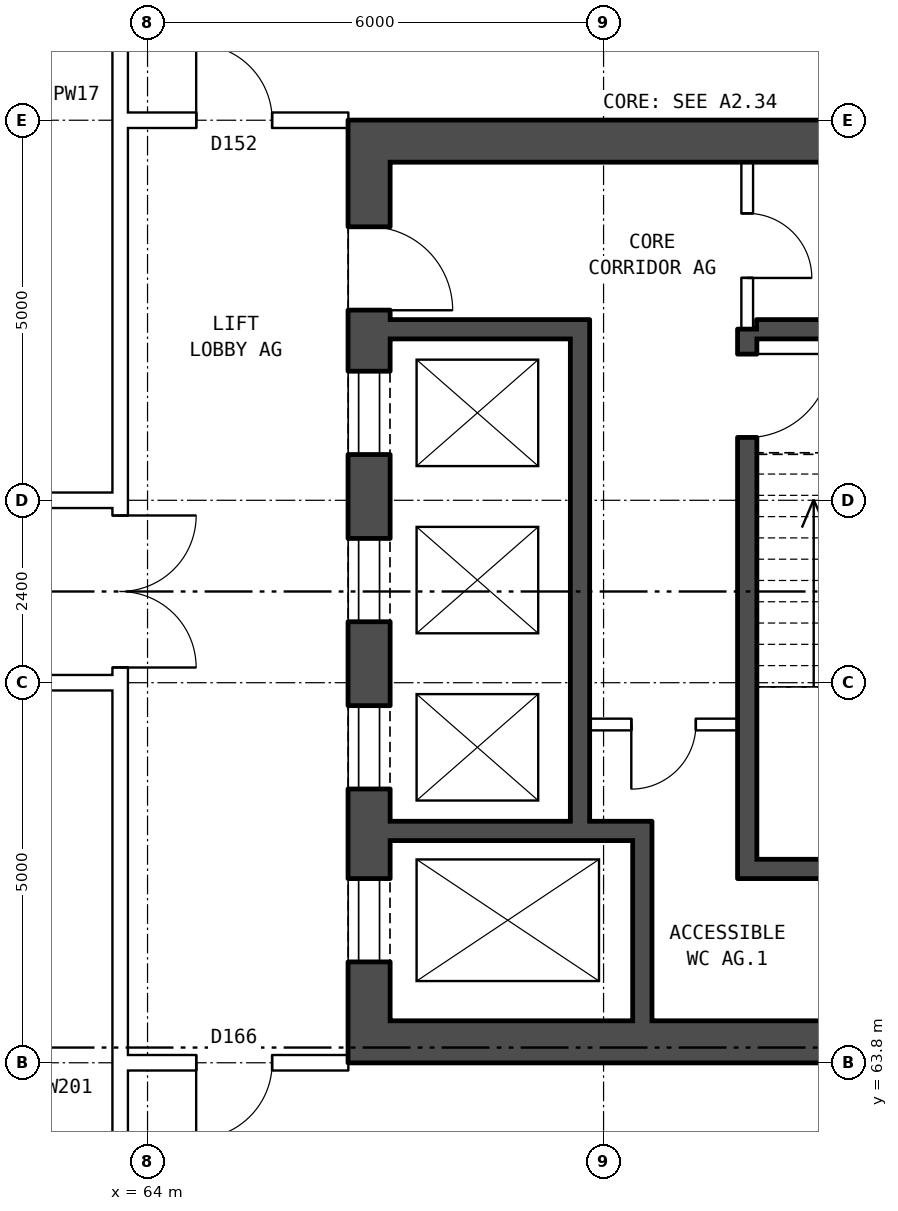
"""IFC4 building model, lengths in metres.
Left out: names, types, materials, properties, quantities, classifications, styles, units other than length and angle.
Written with IfcOpenShell. Run it as: python <this file> out.ifc"""

import sys

from ifc_helpers import new_model, si_unit, direction, frame, frame_2d, origin, place, context, subcontext, project, spatial, rectangle, extrude, element, fill, save


model = new_model("IFC4")
c1 = context("Model", 3, precision=1e-05, world=origin(), true_north=direction((0.0, 1.0)))
c2 = subcontext(c1, "Body", "Model", "MODEL_VIEW")
j1 = project(units=[si_unit("LENGTHUNIT", "METRE"), si_unit("PLANEANGLEUNIT", "RADIAN")], contexts=[c1])
p1 = place(None, origin())
s1 = spatial("IfcSite", under=j1, at=p1, CompositionType="ELEMENT")
p2 = place(p1, origin())
s2 = spatial("IfcBuilding", under=s1, at=p2, CompositionType="ELEMENT")
p3 = place(p2, frame((0.0, 0.0, 119.5)))
s3 = spatial("IfcBuildingStorey", under=s2, at=p3, CompositionType="ELEMENT", Elevation=119.5)
p4 = place(p3, frame((66.915, 63.8, 0.0), z_axis=(0.0, 0.0, 1.0), x_axis=(0.0, 1.0, 0.0)))
e1 = element("IfcWall", 1, at=p4, inside=s3, PredefinedType="SHEAR", context=c2, shape_type="SweptSolid", body=[
    extrude(rectangle(XDim=12.4, YDim=0.55, at=frame_2d((6.2, 0.0))), origin(), (0.0, 0.0, 1.0), 3.6),
])
p5 = place(p4, frame((1.325, 0.0, 0.0)))
e2 = element("IfcOpeningElement", 2, at=p5, cuts=e1, PredefinedType="OPENING", context=c2, shape_type="SweptSolid", body=[
    extrude(rectangle(XDim=1.1, YDim=2.1, at=frame_2d((0.55, 1.05))), frame((0.0, 0.285, 0.0), z_axis=(0.0, -1.0, 0.0), x_axis=(1.0, 0.0, 0.0)), (0.0, 0.0, 1.0), 0.57),
])
p6 = place(p4, frame((3.6, 0.0, 0.0)))
e3 = element("IfcOpeningElement", 3, at=p6, cuts=e1, PredefinedType="OPENING", context=c2, shape_type="SweptSolid", body=[
    extrude(rectangle(XDim=1.1, YDim=2.1, at=frame_2d((0.55, 1.05))), frame((0.0, 0.285, 0.0), z_axis=(0.0, -1.0, 0.0), x_axis=(1.0, 0.0, 0.0)), (0.0, 0.0, 1.0), 0.57),
])
p7 = place(p4, frame((5.8, 0.0, 0.0)))
e4 = element("IfcOpeningElement", 4, at=p7, cuts=e1, PredefinedType="OPENING", context=c2, shape_type="SweptSolid", body=[
    extrude(rectangle(XDim=1.1, YDim=2.1, at=frame_2d((0.55, 1.05))), frame((0.0, 0.285, 0.0), z_axis=(0.0, -1.0, 0.0), x_axis=(1.0, 0.0, 0.0)), (0.0, 0.0, 1.0), 0.57),
])
p8 = place(p4, frame((8.0, 0.0, 0.0)))
e5 = element("IfcOpeningElement", 5, at=p8, cuts=e1, PredefinedType="OPENING", context=c2, shape_type="SweptSolid", body=[
    extrude(rectangle(XDim=1.1, YDim=2.1, at=frame_2d((0.55, 1.05))), frame((0.0, 0.285, 0.0), z_axis=(0.0, -1.0, 0.0), x_axis=(1.0, 0.0, 0.0)), (0.0, 0.0, 1.0), 0.57),
])
p9 = place(p4, frame((9.9, 0.0, 0.0)))
e6 = element("IfcOpeningElement", 6, at=p9, cuts=e1, PredefinedType="OPENING", context=c2, shape_type="SweptSolid", body=[
    extrude(rectangle(XDim=1.1, YDim=2.1, at=frame_2d((0.55, 1.05))), frame((0.0, 0.285, 0.0), z_axis=(0.0, -1.0, 0.0), x_axis=(1.0, 0.0, 0.0)), (0.0, 0.0, 1.0), 0.57),
])
for number, where, z_axis, x_axis in (
    (7, (67.19, 64.075, 0.0), (0.0, 0.0, 1.0), (1.0, 0.0, 0.0)),
    (8, (67.19, 75.925, 0.0), (0.0, 0.0, 1.0), (1.0, 0.0, 0.0)),
):
    element("IfcWall", number, at=place(p3, frame(where, z_axis=z_axis, x_axis=x_axis)), inside=s3, PredefinedType="SHEAR", context=c2, shape_type="SweptSolid", body=[
        extrude(rectangle(XDim=7.9, YDim=0.55, at=frame_2d((3.95, 0.0))), origin(), (0.0, 0.0, 1.0), 3.6),
    ])
p10 = place(p3, frame((72.015, 66.35, 0.0), z_axis=(0.0, 0.0, 1.0), x_axis=(1.0, 0.0, 0.0)))
e9 = element("IfcWall", 9, at=p10, inside=s3, PredefinedType="SHEAR", context=c2, shape_type="SweptSolid", body=[
    extrude(rectangle(XDim=3.075, YDim=0.25, at=frame_2d((1.538, 0.0))), origin(), (0.0, 0.0, 1.0), 3.6),
])
p11 = place(p3, frame((67.19, 66.85, 0.0), z_axis=(0.0, 0.0, 1.0), x_axis=(1.0, 0.0, 0.0)))
e10 = element("IfcWall", 10, at=p11, inside=s3, PredefinedType="SHEAR", context=c2, shape_type="SweptSolid", body=[
    extrude(rectangle(XDim=3.445, YDim=0.25, at=frame_2d((1.723, 0.0))), origin(), (0.0, 0.0, 1.0), 3.6),
])
p12 = place(p3, frame((69.815, 68.25, 0.0), z_axis=(0.0, 0.0, 1.0), x_axis=(1.0, 0.0, 0.0)))
e11 = element("IfcWall", 11, at=p12, inside=s3, PredefinedType="PARTITIONING", context=c2, shape_type="SweptSolid", body=[
    extrude(rectangle(XDim=1.95, YDim=0.15, at=frame_2d((0.975, 0.0))), origin(), (0.0, 0.0, 1.0), 3.6),
])
p13 = place(p12, frame((0.55, 0.0, 0.0)))
e12 = element("IfcOpeningElement", 12, at=p13, cuts=e11, PredefinedType="OPENING", context=c2, shape_type="SweptSolid", body=[
    extrude(rectangle(XDim=0.85, YDim=2.1, at=frame_2d((0.425, 1.05))), frame((0.0, 0.085, 0.0), z_axis=(0.0, -1.0, 0.0), x_axis=(1.0, 0.0, 0.0)), (0.0, 0.0, 1.0), 0.17),
])
p14 = place(p3, frame((67.19, 73.45, 0.0), z_axis=(0.0, 0.0, 1.0), x_axis=(1.0, 0.0, 0.0)))
e13 = element("IfcWall", 13, at=p14, inside=s3, PredefinedType="SHEAR", context=c2, shape_type="SweptSolid", body=[
    extrude(rectangle(XDim=2.375, YDim=0.25, at=frame_2d((1.188, 0.0))), origin(), (0.0, 0.0, 1.0), 3.6),
])
p15 = place(p3, frame((72.015, 73.45, 0.0), z_axis=(0.0, 0.0, 1.0), x_axis=(1.0, 0.0, 0.0)))
e14 = element("IfcWall", 14, at=p15, inside=s3, PredefinedType="SHEAR", context=c2, shape_type="SweptSolid", body=[
    extrude(rectangle(XDim=3.075, YDim=0.25, at=frame_2d((1.538, 0.0))), origin(), (0.0, 0.0, 1.0), 3.6),
])
p16 = place(p3, frame((69.69, 66.975, 0.0), z_axis=(0.0, 0.0, 1.0), x_axis=(0.0, 1.0, 0.0)))
e15 = element("IfcWall", 15, at=p16, inside=s3, PredefinedType="SHEAR", context=c2, shape_type="SweptSolid", body=[
    extrude(rectangle(XDim=6.6, YDim=0.25, at=frame_2d((3.3, 0.0))), origin(), (0.0, 0.0, 1.0), 3.6),
])
p17 = place(p3, frame((70.51, 64.35, 0.0), z_axis=(0.0, 0.0, 1.0), x_axis=(0.0, 1.0, 0.0)))
e16 = element("IfcWall", 16, at=p17, inside=s3, PredefinedType="SHEAR", context=c2, shape_type="SweptSolid", body=[
    extrude(rectangle(XDim=2.375, YDim=0.25, at=frame_2d((1.188, 0.0))), origin(), (0.0, 0.0, 1.0), 3.6),
])
p18 = place(p3, frame((71.89, 66.225, 0.0), z_axis=(0.0, 0.0, 1.0), x_axis=(0.0, 1.0, 0.0)))
e17 = element("IfcWall", 17, at=p18, inside=s3, PredefinedType="SHEAR", context=c2, shape_type="SweptSolid", body=[
    extrude(rectangle(XDim=7.225, YDim=0.25, at=frame_2d((3.612, 0.0))), origin(), (0.0, 0.0, 1.0), 3.6),
])
p19 = place(p18, frame((5.8, 0.0, 0.0)))
e18 = element("IfcOpeningElement", 18, at=p19, cuts=e17, PredefinedType="OPENING", context=c2, shape_type="SweptSolid", body=[
    extrude(rectangle(XDim=1.1, YDim=2.1, at=frame_2d((0.55, 1.05))), frame((0.0, 0.135, 0.0), z_axis=(0.0, -1.0, 0.0), x_axis=(1.0, 0.0, 0.0)), (0.0, 0.0, 1.0), 0.27),
])
p20 = place(p3, frame((71.89, 73.45, 0.0), z_axis=(0.0, 0.0, 1.0), x_axis=(0.0, 1.0, 0.0)))
e19 = element("IfcWall", 19, at=p20, inside=s3, PredefinedType="PARTITIONING", context=c2, shape_type="SweptSolid", body=[
    extrude(rectangle(XDim=2.2, YDim=0.15, at=frame_2d((1.1, 0.0))), origin(), (0.0, 0.0, 1.0), 3.6),
])
p21 = place(p20, frame((0.675, 0.0, 0.0)))
e20 = element("IfcOpeningElement", 20, at=p21, cuts=e19, PredefinedType="OPENING", context=c2, shape_type="SweptSolid", body=[
    extrude(rectangle(XDim=0.85, YDim=2.1, at=frame_2d((0.425, 1.05))), frame((0.0, 0.085, 0.0), z_axis=(0.0, -1.0, 0.0), x_axis=(1.0, 0.0, 0.0)), (0.0, 0.0, 1.0), 0.17),
])
p22 = place(p3, frame((63.64, 63.9, 0.0), z_axis=(0.0, 0.0, 1.0), x_axis=(0.0, 1.0, 0.0)))
e21 = element("IfcWall", 21, at=p22, inside=s3, PredefinedType="PARTITIONING", context=c2, shape_type="SweptSolid", body=[
    extrude(rectangle(XDim=12.2, YDim=0.2, at=frame_2d((6.1, 0.0))), origin(), (0.0, 0.0, 1.0), 3.6),
])
p23 = place(p22, frame((5.1, 0.0, 0.0)))
e22 = element("IfcOpeningElement", 22, at=p23, cuts=e21, PredefinedType="OPENING", context=c2, shape_type="SweptSolid", body=[
    extrude(rectangle(XDim=2.0, YDim=2.1, at=frame_2d((1.0, 1.05))), frame((0.0, 0.11, 0.0), z_axis=(0.0, -1.0, 0.0), x_axis=(1.0, 0.0, 0.0)), (0.0, 0.0, 1.0), 0.22),
])
p24 = place(p3, frame((63.54, 63.8, 0.0), z_axis=(0.0, 0.0, 1.0), x_axis=(1.0, 0.0, 0.0)))
e23 = element("IfcWall", 23, at=p24, inside=s3, PredefinedType="PARTITIONING", context=c2, shape_type="SweptSolid", body=[
    extrude(rectangle(XDim=3.1, YDim=0.2, at=frame_2d((1.55, 0.0))), origin(), (0.0, 0.0, 1.0), 3.6),
])
p25 = place(p24, frame((1.1, 0.0, 0.0)))
e24 = element("IfcOpeningElement", 24, at=p25, cuts=e23, PredefinedType="OPENING", context=c2, shape_type="SweptSolid", body=[
    extrude(rectangle(XDim=1.0, YDim=2.1, at=frame_2d((0.5, 1.05))), frame((0.0, 0.11, 0.0), z_axis=(0.0, -1.0, 0.0), x_axis=(1.0, 0.0, 0.0)), (0.0, 0.0, 1.0), 0.22),
])
p26 = place(p3, frame((44.36, 68.8, 0.0), z_axis=(0.0, 0.0, 1.0), x_axis=(1.0, 0.0, 0.0)))
e25 = element("IfcWall", 25, at=p26, inside=s3, PredefinedType="PARTITIONING", context=c2, shape_type="SweptSolid", body=[
    extrude(rectangle(XDim=19.28, YDim=0.2, at=frame_2d((9.64, 0.0))), origin(), (0.0, 0.0, 1.0), 3.6),
])
p27 = place(p26, frame((4.92, 0.0, 0.0)))
e26 = element("IfcOpeningElement", 26, at=p27, cuts=e25, PredefinedType="OPENING", context=c2, shape_type="SweptSolid", body=[
    extrude(rectangle(XDim=1.8, YDim=2.1, at=frame_2d((0.9, 1.05))), frame((0.0, 0.11, 0.0), z_axis=(0.0, -1.0, 0.0), x_axis=(1.0, 0.0, 0.0)), (0.0, 0.0, 1.0), 0.22),
])
p28 = place(p3, frame((44.36, 71.2, 0.0), z_axis=(0.0, 0.0, 1.0), x_axis=(1.0, 0.0, 0.0)))
e27 = element("IfcWall", 27, at=p28, inside=s3, PredefinedType="PARTITIONING", context=c2, shape_type="SweptSolid", body=[
    extrude(rectangle(XDim=19.28, YDim=0.2, at=frame_2d((9.64, 0.0))), origin(), (0.0, 0.0, 1.0), 3.6),
])
p29 = place(p28, frame((9.14, 0.0, 0.0)))
e28 = element("IfcOpeningElement", 28, at=p29, cuts=e27, PredefinedType="OPENING", context=c2, shape_type="SweptSolid", body=[
    extrude(rectangle(XDim=1.0, YDim=2.1, at=frame_2d((0.5, 1.05))), frame((0.0, 0.11, 0.0), z_axis=(0.0, -1.0, 0.0), x_axis=(1.0, 0.0, 0.0)), (0.0, 0.0, 1.0), 0.22),
])
p30 = place(p3, frame((63.54, 76.2, 0.0), z_axis=(0.0, 0.0, 1.0), x_axis=(1.0, 0.0, 0.0)))
e29 = element("IfcWall", 29, at=p30, inside=s3, PredefinedType="PARTITIONING", context=c2, shape_type="SweptSolid", body=[
    extrude(rectangle(XDim=3.1, YDim=0.2, at=frame_2d((1.55, 0.0))), origin(), (0.0, 0.0, 1.0), 3.6),
])
p31 = place(p30, frame((1.1, 0.0, 0.0)))
e30 = element("IfcOpeningElement", 30, at=p31, cuts=e29, PredefinedType="OPENING", context=c2, shape_type="SweptSolid", body=[
    extrude(rectangle(XDim=1.0, YDim=2.1, at=frame_2d((0.5, 1.05))), frame((0.0, 0.11, 0.0), z_axis=(0.0, -1.0, 0.0), x_axis=(1.0, 0.0, 0.0)), (0.0, 0.0, 1.0), 0.22),
])
p32 = place(p3, frame((63.64, 60.7, 0.0), z_axis=(0.0, 0.0, 1.0), x_axis=(0.0, 1.0, 0.0)))
e31 = element("IfcWall", 31, at=p32, inside=s3, PredefinedType="PARTITIONING", context=c2, shape_type="SweptSolid", body=[
    extrude(rectangle(XDim=3.2, YDim=0.2, at=frame_2d((1.6, 0.0))), origin(), (0.0, 0.0, 1.0), 3.6),
])
p33 = place(p32, frame((1.1, 0.0, 0.0)))
e32 = element("IfcOpeningElement", 32, at=p33, cuts=e31, PredefinedType="OPENING", context=c2, shape_type="SweptSolid", body=[
    extrude(rectangle(XDim=1.0, YDim=2.1, at=frame_2d((0.5, 1.05))), frame((0.0, 0.11, 0.0), z_axis=(0.0, -1.0, 0.0), x_axis=(1.0, 0.0, 0.0)), (0.0, 0.0, 1.0), 0.22),
])
p34 = place(p3, frame((63.64, 76.1, 0.0), z_axis=(0.0, 0.0, 1.0), x_axis=(0.0, 1.0, 0.0)))
e33 = element("IfcWall", 33, at=p34, inside=s3, PredefinedType="PARTITIONING", context=c2, shape_type="SweptSolid", body=[
    extrude(rectangle(XDim=3.2, YDim=0.2, at=frame_2d((1.6, 0.0))), origin(), (0.0, 0.0, 1.0), 3.6),
])
p35 = place(p34, frame((1.1, 0.0, 0.0)))
e34 = element("IfcOpeningElement", 34, at=p35, cuts=e33, PredefinedType="OPENING", context=c2, shape_type="SweptSolid", body=[
    extrude(rectangle(XDim=1.0, YDim=2.1, at=frame_2d((0.5, 1.05))), frame((0.0, 0.11, 0.0), z_axis=(0.0, -1.0, 0.0), x_axis=(1.0, 0.0, 0.0)), (0.0, 0.0, 1.0), 0.22),
])
p36 = place(p5, origin())
e35 = element("IfcDoor", 35, at=p36, inside=s3, OperationType="DOUBLE_DOOR_SLIDING", PredefinedType="DOOR", context=c2, shape_type="SweptSolid", body=[
    extrude(rectangle(XDim=1.1, YDim=2.1, at=frame_2d((0.55, 1.05))), frame((0.0, -0.21, 0.0), z_axis=(0.0, -1.0, 0.0), x_axis=(1.0, 0.0, 0.0)), (0.0, 0.0, 1.0), 0.05),
])
fill(e2, e35)
p37 = place(p6, origin())
e36 = element("IfcDoor", 36, at=p37, inside=s3, OperationType="DOUBLE_DOOR_SLIDING", PredefinedType="DOOR", context=c2, shape_type="SweptSolid", body=[
    extrude(rectangle(XDim=1.1, YDim=2.1, at=frame_2d((0.55, 1.05))), frame((0.0, -0.21, 0.0), z_axis=(0.0, -1.0, 0.0), x_axis=(1.0, 0.0, 0.0)), (0.0, 0.0, 1.0), 0.05),
])
fill(e3, e36)
p38 = place(p7, origin())
e37 = element("IfcDoor", 37, at=p38, inside=s3, OperationType="DOUBLE_DOOR_SLIDING", PredefinedType="DOOR", context=c2, shape_type="SweptSolid", body=[
    extrude(rectangle(XDim=1.1, YDim=2.1, at=frame_2d((0.55, 1.05))), frame((0.0, -0.21, 0.0), z_axis=(0.0, -1.0, 0.0), x_axis=(1.0, 0.0, 0.0)), (0.0, 0.0, 1.0), 0.05),
])
fill(e4, e37)
p39 = place(p8, origin())
e38 = element("IfcDoor", 38, at=p39, inside=s3, OperationType="DOUBLE_DOOR_SLIDING", PredefinedType="DOOR", context=c2, shape_type="SweptSolid", body=[
    extrude(rectangle(XDim=1.1, YDim=2.1, at=frame_2d((0.55, 1.05))), frame((0.0, -0.21, 0.0), z_axis=(0.0, -1.0, 0.0), x_axis=(1.0, 0.0, 0.0)), (0.0, 0.0, 1.0), 0.05),
])
fill(e5, e38)
p40 = place(p9, frame((1.1, 0.0, 0.0), z_axis=(0.0, 0.0, 1.0), x_axis=(-1.0, 0.0, 0.0)))
e39 = element("IfcDoor", 39, at=p40, inside=s3, OperationType="SINGLE_SWING_RIGHT", PredefinedType="DOOR", context=c2, shape_type="SweptSolid", body=[
    extrude(rectangle(XDim=1.1, YDim=2.1, at=frame_2d((0.55, 1.05))), frame((0.0, 0.26, 0.0), z_axis=(0.0, -1.0, 0.0), x_axis=(1.0, 0.0, 0.0)), (0.0, 0.0, 1.0), 0.05),
])
fill(e6, e39)
p41 = place(p19, frame((1.1, 0.0, 0.0), z_axis=(0.0, 0.0, 1.0), x_axis=(-1.0, 0.0, 0.0)))
e40 = element("IfcDoor", 40, at=p41, inside=s3, OperationType="SINGLE_SWING_LEFT", PredefinedType="DOOR", context=c2, shape_type="SweptSolid", body=[
    extrude(rectangle(XDim=1.1, YDim=2.1, at=frame_2d((0.55, 1.05))), frame((0.0, 0.025, 0.0), z_axis=(0.0, -1.0, 0.0), x_axis=(1.0, 0.0, 0.0)), (0.0, 0.0, 1.0), 0.05),
])
fill(e18, e40)
p42 = place(p13, frame((0.85, 0.0, 0.0), z_axis=(0.0, 0.0, 1.0), x_axis=(-1.0, 0.0, 0.0)))
e41 = element("IfcDoor", 41, at=p42, inside=s3, OperationType="SINGLE_SWING_RIGHT", PredefinedType="DOOR", context=c2, shape_type="SweptSolid", body=[
    extrude(rectangle(XDim=0.85, YDim=2.1, at=frame_2d((0.425, 1.05))), frame((0.0, 0.025, 0.0), z_axis=(0.0, -1.0, 0.0), x_axis=(1.0, 0.0, 0.0)), (0.0, 0.0, 1.0), 0.05),
])
fill(e12, e41)
p43 = place(p21, frame((0.85, 0.0, 0.0), z_axis=(0.0, 0.0, 1.0), x_axis=(-1.0, 0.0, 0.0)))
e42 = element("IfcDoor", 42, at=p43, inside=s3, OperationType="SINGLE_SWING_RIGHT", PredefinedType="DOOR", context=c2, shape_type="SweptSolid", body=[
    extrude(rectangle(XDim=0.85, YDim=2.1, at=frame_2d((0.425, 1.05))), frame((0.0, 0.025, 0.0), z_axis=(0.0, -1.0, 0.0), x_axis=(1.0, 0.0, 0.0)), (0.0, 0.0, 1.0), 0.05),
])
fill(e20, e42)
p44 = place(p23, frame((2.0, 0.0, 0.0), z_axis=(0.0, 0.0, 1.0), x_axis=(-1.0, 0.0, 0.0)))
e43 = element("IfcDoor", 43, at=p44, inside=s3, OperationType="DOUBLE_DOOR_SINGLE_SWING", PredefinedType="DOOR", context=c2, shape_type="SweptSolid", body=[
    extrude(rectangle(XDim=2.0, YDim=2.1, at=frame_2d((1.0, 1.05))), frame((0.0, 0.025, 0.0), z_axis=(0.0, -1.0, 0.0), x_axis=(1.0, 0.0, 0.0)), (0.0, 0.0, 1.0), 0.05),
])
fill(e22, e43)
p45 = place(p25, frame((1.0, 0.0, 0.0), z_axis=(0.0, 0.0, 1.0), x_axis=(-1.0, 0.0, 0.0)))
e44 = element("IfcDoor", 44, at=p45, inside=s3, OperationType="SINGLE_SWING_RIGHT", PredefinedType="DOOR", context=c2, shape_type="SweptSolid", body=[
    extrude(rectangle(XDim=1.0, YDim=2.1, at=frame_2d((0.5, 1.05))), frame((0.0, 0.025, 0.0), z_axis=(0.0, -1.0, 0.0), x_axis=(1.0, 0.0, 0.0)), (0.0, 0.0, 1.0), 0.05),
])
fill(e24, e44)
p46 = place(p31, origin())
e45 = element("IfcDoor", 45, at=p46, inside=s3, OperationType="SINGLE_SWING_LEFT", PredefinedType="DOOR", context=c2, shape_type="SweptSolid", body=[
    extrude(rectangle(XDim=1.0, YDim=2.1, at=frame_2d((0.5, 1.05))), frame((0.0, 0.025, 0.0), z_axis=(0.0, -1.0, 0.0), x_axis=(1.0, 0.0, 0.0)), (0.0, 0.0, 1.0), 0.05),
])
fill(e30, e45)
save(model, sys.argv[1])
